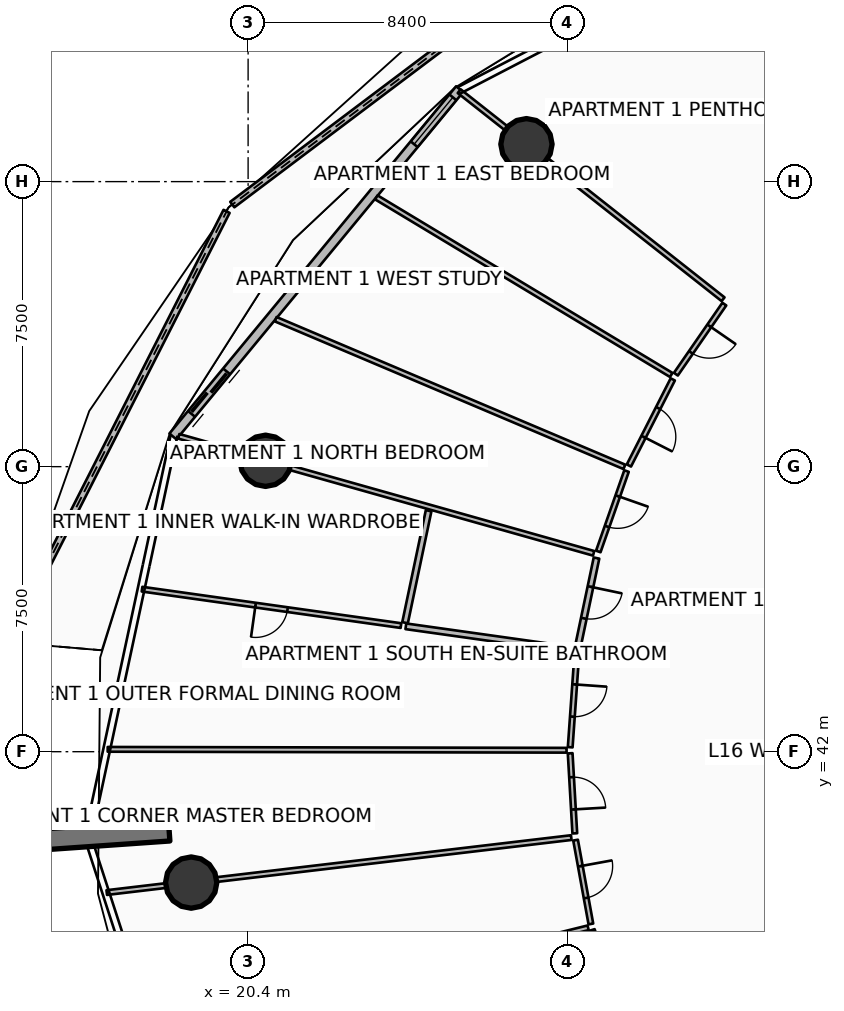
"""IFC4 building model, lengths in metres.
Left out: names, types, materials, properties, quantities, classifications, styles, units other than length and angle.
Written with IfcOpenShell. Run it as: python <this file> out.ifc"""

import sys

from ifc_helpers import new_model, si_unit, direction, frame, frame_2d, origin, origin_2d, place, context, subcontext, project, spatial, polyline, rectangle, circle, outline, extrude, element, fill, save


model = new_model("IFC4")
c1 = context("Model", 3, precision=1e-05, world=origin(), true_north=direction((0.0, 1.0)))
c2 = subcontext(c1, "Body", "Model", "MODEL_VIEW")
j1 = project(units=[si_unit("LENGTHUNIT", "METRE"), si_unit("PLANEANGLEUNIT", "RADIAN")], contexts=[c1])
p1 = place(None, origin())
s1 = spatial("IfcSite", under=j1, at=p1, CompositionType="ELEMENT")
p2 = place(p1, origin())
s2 = spatial("IfcBuilding", under=s1, at=p2, CompositionType="ELEMENT")
p3 = place(p2, frame((0.0, 0.0, 67.65)))
s3 = spatial("IfcBuildingStorey", under=s2, at=p3, CompositionType="ELEMENT", Elevation=67.65)
p4 = place(p3, frame((18.322, 39.925, 0.0), z_axis=(0.0, 0.0, 1.0), x_axis=(-0.997564163539, -0.069754853754, 0.0)))
e1 = element("IfcWall", 1, at=p4, inside=s3, PredefinedType="SOLIDWALL", context=c2, shape_type="SweptSolid", body=[
    extrude(rectangle(XDim=3.5, YDim=0.55, at=frame_2d((1.75, 0.0))), origin(), (0.0, 0.0, 1.0), 3.75),
])
for number, where, z_axis, x_axis in (
    (2, (27.724, 57.984, 0.0), (0.0, 0.0, 1.0), (1.0, 0.0, 0.0)),
    (3, (20.859, 49.655, 0.0), (0.0, 0.0, 1.0), (1.0, 0.0, 0.0)),
    (4, (18.902, 38.556, 0.0), (0.0, 0.0, 1.0), (1.0, 0.0, 0.0)),
):
    element("IfcColumn", number, at=place(p3, frame(where, z_axis=z_axis, x_axis=x_axis)), inside=s3, PredefinedType="COLUMN", context=c2, shape_type="SweptSolid", body=[
        extrude(circle(Radius=0.675, at=origin_2d()), origin(), (0.0, 0.0, 1.0), 3.35),
    ])
p5 = place(p3, frame((29.413, 63.495, 0.0), z_axis=(0.0, 0.0, 1.0), x_axis=(-0.798916487869, -0.601441971773, 0.0)))
e5 = element("IfcWall", 5, at=p5, inside=s3, PredefinedType="PARAPET", context=c2, shape_type="SweptSolid", body=[
    extrude(outline(polyline([(0.0, 0.0), (11.803, 0.0), (11.803, 1.348), (5.902, 1.182), (0.0, 1.12), (0.0, 0.0)])), frame((0.0, 0.09, 0.0), z_axis=(0.0, -1.0, 0.0), x_axis=(1.0, 0.0, 0.0)), (0.0, 0.0, 1.0), 0.18),
])
p6 = place(p3, frame((19.833, 56.217, 0.0), z_axis=(0.0, 0.0, 1.0), x_axis=(-0.452795448166, -0.891614424581, 0.0)))
e6 = element("IfcWall", 6, at=p6, inside=s3, PredefinedType="PARAPET", context=c2, shape_type="SweptSolid", body=[
    extrude(outline(polyline([(0.0, 0.0), (12.717, 0.0), (12.717, 1.747), (6.358, 1.562), (0.0, 1.348), (0.0, 0.0)])), frame((0.0, 0.09, 0.0), z_axis=(0.0, -1.0, 0.0), x_axis=(1.0, 0.0, 0.0)), (0.0, 0.0, 1.0), 0.18),
])
p7 = place(p3, frame((25.967, 59.433, 0.0), z_axis=(0.0, 0.0, 1.0), x_axis=(-0.636674332663, -0.771132799281, 0.0)))
e7 = element("IfcWall", 7, at=p7, inside=s3, PredefinedType="SOLIDWALL", context=c2, shape_type="SweptSolid", body=[
    extrude(rectangle(XDim=11.851, YDim=0.24, at=frame_2d((5.926, 0.0))), origin(), (0.0, 0.0, 1.0), 2.3),
])
p8 = place(p7, frame((9.631, 0.0, 0.0)))
e8 = element("IfcOpeningElement", 8, at=p8, cuts=e7, PredefinedType="OPENING", context=c2, shape_type="SweptSolid", body=[
    extrude(rectangle(XDim=1.45, YDim=2.15, at=frame_2d((0.725, 1.075))), frame((0.0, 0.13, 0.0), z_axis=(0.0, -1.0, 0.0), x_axis=(1.0, 0.0, 0.0)), (0.0, 0.0, 1.0), 0.26),
])
p9 = place(p7, frame((0.28, 0.0, 0.65)))
e9 = element("IfcOpeningElement", 9, at=p9, cuts=e7, PredefinedType="OPENING", context=c2, shape_type="SweptSolid", body=[
    extrude(rectangle(XDim=1.6, YDim=1.5, at=frame_2d((0.8, 0.75))), frame((0.0, 0.13, 0.0), z_axis=(0.0, -1.0, 0.0), x_axis=(1.0, 0.0, 0.0)), (0.0, 0.0, 1.0), 0.26),
])
p10 = place(p3, frame((32.898, 53.905, 0.0), z_axis=(0.0, 0.0, 1.0), x_axis=(-0.78532854108, 0.619079221558, 0.0)))
e10 = element("IfcWall", 10, at=p10, inside=s3, PredefinedType="PARTITIONING", context=c2, shape_type="SweptSolid", body=[
    extrude(rectangle(XDim=8.842, YDim=0.125, at=frame_2d((4.421, 0.0))), origin(), (0.0, 0.0, 1.0), 2.717),
])
p11 = place(p3, frame((31.534, 51.913, 0.0), z_axis=(0.0, 0.0, 1.0), x_axis=(-0.856706990958, 0.515803384676, 0.0)))
e11 = element("IfcWall", 11, at=p11, inside=s3, PredefinedType="PARTITIONING", context=c2, shape_type="SweptSolid", body=[
    extrude(rectangle(XDim=9.057, YDim=0.125, at=frame_2d((4.528, 0.0))), origin(), (0.0, 0.0, 1.0), 2.79),
])
p12 = place(p3, frame((30.301, 49.494, 0.0), z_axis=(0.0, 0.0, 1.0), x_axis=(-0.920840746031, 0.389938867579, 0.0)))
e12 = element("IfcWall", 12, at=p12, inside=s3, PredefinedType="PARTITIONING", context=c2, shape_type="SweptSolid", body=[
    extrude(rectangle(XDim=9.966, YDim=0.125, at=frame_2d((4.983, 0.0))), origin(), (0.0, 0.0, 1.0), 2.79),
])
p13 = place(p3, frame((32.931, 53.778, 0.0), z_axis=(0.0, 0.0, 1.0), x_axis=(-0.568541738061, -0.822654418382, 0.0)))
e13 = element("IfcWall", 13, at=p13, inside=s3, PredefinedType="PARTITIONING", context=c2, shape_type="SweptSolid", body=[
    extrude(rectangle(XDim=2.242, YDim=0.125, at=frame_2d((1.121, 0.0))), origin(), (0.0, 0.0, 1.0), 2.717),
])
p14 = place(p13, frame((0.696, 0.0, 0.0)))
e14 = element("IfcOpeningElement", 14, at=p14, cuts=e13, PredefinedType="OPENING", context=c2, shape_type="SweptSolid", body=[
    extrude(rectangle(XDim=0.85, YDim=2.06, at=frame_2d((0.425, 1.03))), frame((0.0, 0.073, 0.0), z_axis=(0.0, -1.0, 0.0), x_axis=(1.0, 0.0, 0.0)), (0.0, 0.0, 1.0), 0.145),
])
p15 = place(p3, frame((31.575, 51.796, 0.0), z_axis=(0.0, 0.0, 1.0), x_axis=(-0.454037986735, -0.890982326762, 0.0)))
e15 = element("IfcWall", 15, at=p15, inside=s3, PredefinedType="PARTITIONING", context=c2, shape_type="SweptSolid", body=[
    extrude(rectangle(XDim=2.542, YDim=0.125, at=frame_2d((1.271, 0.0))), origin(), (0.0, 0.0, 1.0), 2.79),
])
p16 = place(p15, frame((0.846, 0.0, 0.0)))
e16 = element("IfcOpeningElement", 16, at=p16, cuts=e15, PredefinedType="OPENING", context=c2, shape_type="SweptSolid", body=[
    extrude(rectangle(XDim=0.85, YDim=2.06, at=frame_2d((0.425, 1.03))), frame((0.0, 0.073, 0.0), z_axis=(0.0, -1.0, 0.0), x_axis=(1.0, 0.0, 0.0)), (0.0, 0.0, 1.0), 0.145),
])
p17 = place(p3, frame((30.358, 49.384, 0.0), z_axis=(0.0, 0.0, 1.0), x_axis=(-0.331344536708, -0.943509829304, 0.0)))
e17 = element("IfcWall", 17, at=p17, inside=s3, PredefinedType="PARTITIONING", context=c2, shape_type="SweptSolid", body=[
    extrude(rectangle(XDim=2.242, YDim=0.125, at=frame_2d((1.121, 0.0))), origin(), (0.0, 0.0, 1.0), 2.717),
])
p18 = place(p17, frame((0.696, 0.0, 0.0)))
e18 = element("IfcOpeningElement", 18, at=p18, cuts=e17, PredefinedType="OPENING", context=c2, shape_type="SweptSolid", body=[
    extrude(rectangle(XDim=0.85, YDim=2.06, at=frame_2d((0.425, 1.03))), frame((0.0, 0.073, 0.0), z_axis=(0.0, -1.0, 0.0), x_axis=(1.0, 0.0, 0.0)), (0.0, 0.0, 1.0), 0.145),
])
p19 = place(p3, frame((29.492, 47.22, 0.0), z_axis=(0.0, 0.0, 1.0), x_axis=(-0.962454721813, 0.271442274635, 0.0)))
e19 = element("IfcWall", 19, at=p19, inside=s3, PredefinedType="PARTITIONING", context=c2, shape_type="SweptSolid", body=[
    extrude(rectangle(XDim=11.344, YDim=0.125, at=frame_2d((5.672, 0.0))), origin(), (0.0, 0.0, 1.0), 2.717),
])
p20 = place(p3, frame((29.568, 47.095, 0.0), z_axis=(0.0, 0.0, 1.0), x_axis=(-0.205861309483, -0.978581177654, 0.0)))
e20 = element("IfcWall", 20, at=p20, inside=s3, PredefinedType="PARTITIONING", context=c2, shape_type="SweptSolid", body=[
    extrude(rectangle(XDim=2.392, YDim=0.15, at=frame_2d((1.196, 0.0))), origin(), (0.0, 0.0, 1.0), 2.717),
])
p21 = place(p20, frame((0.771, 0.0, 0.0)))
e21 = element("IfcOpeningElement", 21, at=p21, cuts=e20, PredefinedType="OPENING", context=c2, shape_type="SweptSolid", body=[
    extrude(rectangle(XDim=0.85, YDim=2.06, at=frame_2d((0.425, 1.03))), frame((0.0, 0.085, 0.0), z_axis=(0.0, -1.0, 0.0), x_axis=(1.0, 0.0, 0.0)), (0.0, 0.0, 1.0), 0.17),
])
p22 = place(p3, frame((25.15, 48.341, 0.0), z_axis=(0.0, 0.0, 1.0), x_axis=(-0.205879759174, -0.978577296264, 0.0)))
e22 = element("IfcWall", 22, at=p22, inside=s3, PredefinedType="PARTITIONING", context=c2, shape_type="SweptSolid", body=[
    extrude(rectangle(XDim=3.012, YDim=0.15, at=frame_2d((1.506, 0.0))), origin(), (0.0, 0.0, 1.0), 2.717),
])
p23 = place(p3, frame((28.968, 44.678, 0.0), z_axis=(0.0, 0.0, 1.0), x_axis=(-0.990240767804, 0.139367219172, 0.0)))
e23 = element("IfcWall", 23, at=p23, inside=s3, PredefinedType="PARTITIONING", context=c2, shape_type="SweptSolid", body=[
    extrude(rectangle(XDim=4.46, YDim=0.15, at=frame_2d((2.23, 0.0))), origin(), (0.0, 0.0, 1.0), 2.79),
])
p24 = place(p3, frame((24.422, 45.318, 0.0), z_axis=(0.0, 0.0, 1.0), x_axis=(-0.990243959665, 0.139344538274, 0.0)))
e24 = element("IfcWall", 24, at=p24, inside=s3, PredefinedType="PARTITIONING", context=c2, shape_type="SweptSolid", body=[
    extrude(rectangle(XDim=6.88, YDim=0.125, at=frame_2d((3.44, 0.0))), origin(), (0.0, 0.0, 1.0), 2.79),
])
p25 = place(p24, frame((3.015, 0.0, 0.0)))
e25 = element("IfcOpeningElement", 25, at=p25, cuts=e24, PredefinedType="OPENING", context=c2, shape_type="SweptSolid", body=[
    extrude(rectangle(XDim=0.85, YDim=2.06, at=frame_2d((0.425, 1.03))), frame((0.0, 0.073, 0.0), z_axis=(0.0, -1.0, 0.0), x_axis=(1.0, 0.0, 0.0)), (0.0, 0.0, 1.0), 0.145),
])
p26 = place(p3, frame((28.78, 42.038, 0.0), z_axis=(0.0, 0.0, 1.0), x_axis=(-0.999998036955, 0.001981435282, 0.0)))
e26 = element("IfcWall", 26, at=p26, inside=s3, PredefinedType="PARTITIONING", context=c2, shape_type="SweptSolid", body=[
    extrude(rectangle(XDim=12.075, YDim=0.125, at=frame_2d((6.038, 0.0))), origin(), (0.0, 0.0, 1.0), 2.79),
])
p27 = place(p3, frame((29.05, 44.576, 0.0), z_axis=(0.0, 0.0, 1.0), x_axis=(-0.070831673661, -0.997488282641, 0.0)))
e27 = element("IfcWall", 27, at=p27, inside=s3, PredefinedType="PARTITIONING", context=c2, shape_type="SweptSolid", body=[
    extrude(rectangle(XDim=2.464, YDim=0.125, at=frame_2d((1.232, 0.0))), origin(), (0.0, 0.0, 1.0), 2.79),
])
p28 = place(p27, frame((0.807, 0.0, 0.0)))
e28 = element("IfcOpeningElement", 28, at=p28, cuts=e27, PredefinedType="OPENING", context=c2, shape_type="SweptSolid", body=[
    extrude(rectangle(XDim=0.85, YDim=2.06, at=frame_2d((0.425, 1.03))), frame((0.0, 0.073, 0.0), z_axis=(0.0, -1.0, 0.0), x_axis=(1.0, 0.0, 0.0)), (0.0, 0.0, 1.0), 0.145),
])
p29 = place(p3, frame((28.875, 41.958, 0.0), z_axis=(0.0, 0.0, 1.0), x_axis=(0.057962417622, -0.998318765797, 0.0)))
e29 = element("IfcWall", 29, at=p29, inside=s3, PredefinedType="PARTITIONING", context=c2, shape_type="SweptSolid", body=[
    extrude(rectangle(XDim=2.11, YDim=0.125, at=frame_2d((1.055, 0.0))), origin(), (0.0, 0.0, 1.0), 2.717),
])
p30 = place(p29, frame((0.63, 0.0, 0.0)))
e30 = element("IfcOpeningElement", 30, at=p30, cuts=e29, PredefinedType="OPENING", context=c2, shape_type="SweptSolid", body=[
    extrude(rectangle(XDim=0.85, YDim=2.06, at=frame_2d((0.425, 1.03))), frame((0.0, 0.073, 0.0), z_axis=(0.0, -1.0, 0.0), x_axis=(1.0, 0.0, 0.0)), (0.0, 0.0, 1.0), 0.145),
])
p31 = place(p3, frame((28.903, 39.74, 0.0), z_axis=(0.0, 0.0, 1.0), x_axis=(-0.993068040113, -0.117540919282, 0.0)))
e31 = element("IfcWall", 31, at=p31, inside=s3, PredefinedType="PARTITIONING", context=c2, shape_type="SweptSolid", body=[
    extrude(rectangle(XDim=12.309, YDim=0.125, at=frame_2d((6.154, 0.0))), origin(), (0.0, 0.0, 1.0), 2.717),
])
p32 = place(p3, frame((29.347, 37.366, 0.0), z_axis=(0.0, 0.0, 1.0), x_axis=(-0.970510462135, -0.241059002917, 0.0)))
e32 = element("IfcWall", 32, at=p32, inside=s3, PredefinedType="PARTITIONING", context=c2, shape_type="SweptSolid", body=[
    extrude(rectangle(XDim=11.79, YDim=0.125, at=frame_2d((5.895, 0.0))), origin(), (0.0, 0.0, 1.0), 2.79),
])
p33 = place(p3, frame((29.017, 39.673, 0.0), z_axis=(0.0, 0.0, 1.0), x_axis=(0.179632658462, -0.983733758704, 0.0)))
e33 = element("IfcWall", 33, at=p33, inside=s3, PredefinedType="PARTITIONING", context=c2, shape_type="SweptSolid", body=[
    extrude(rectangle(XDim=2.242, YDim=0.125, at=frame_2d((1.121, 0.0))), origin(), (0.0, 0.0, 1.0), 2.717),
])
p34 = place(p33, frame((0.696, 0.0, 0.0)))
e34 = element("IfcOpeningElement", 34, at=p34, cuts=e33, PredefinedType="OPENING", context=c2, shape_type="SweptSolid", body=[
    extrude(rectangle(XDim=0.85, YDim=2.06, at=frame_2d((0.425, 1.03))), frame((0.0, 0.073, 0.0), z_axis=(0.0, -1.0, 0.0), x_axis=(1.0, 0.0, 0.0)), (0.0, 0.0, 1.0), 0.145),
])
p35 = place(p3, frame((29.458, 37.312, 0.0), z_axis=(0.0, 0.0, 1.0), x_axis=(0.305338513131, -0.952243872335, 0.0)))
e35 = element("IfcWall", 35, at=p35, inside=s3, PredefinedType="PARTITIONING", context=c2, shape_type="SweptSolid", body=[
    extrude(rectangle(XDim=2.392, YDim=0.125, at=frame_2d((1.196, 0.0))), origin(), (0.0, 0.0, 1.0), 2.79),
])
p36 = place(p35, frame((0.771, 0.0, 0.0)))
e36 = element("IfcOpeningElement", 36, at=p36, cuts=e35, PredefinedType="OPENING", context=c2, shape_type="SweptSolid", body=[
    extrude(rectangle(XDim=0.85, YDim=2.06, at=frame_2d((0.425, 1.03))), frame((0.0, 0.073, 0.0), z_axis=(0.0, -1.0, 0.0), x_axis=(1.0, 0.0, 0.0)), (0.0, 0.0, 1.0), 0.145),
])
p37 = place(p8, origin())
e37 = element("IfcDoor", 37, at=p37, inside=s3, OperationType="DOUBLE_DOOR_SLIDING", PredefinedType="DOOR", context=c2, shape_type="SweptSolid", body=[
    extrude(rectangle(XDim=1.45, YDim=2.15, at=frame_2d((0.725, 1.075))), frame((0.0, 0.025, 0.0), z_axis=(0.0, -1.0, 0.0), x_axis=(1.0, 0.0, 0.0)), (0.0, 0.0, 1.0), 0.05),
])
fill(e8, e37)
p38 = place(p9, origin())
e38 = element("IfcWindow", 38, at=p38, inside=s3, PartitioningType="SINGLE_PANEL", PredefinedType="WINDOW", context=c2, shape_type="SweptSolid", body=[
    extrude(rectangle(XDim=1.6, YDim=1.5, at=frame_2d((0.8, 0.75))), frame((0.0, 0.03, 0.0), z_axis=(0.0, -1.0, 0.0), x_axis=(1.0, 0.0, 0.0)), (0.0, 0.0, 1.0), 0.06),
])
fill(e9, e38)
p39 = place(p14, origin())
e39 = element("IfcDoor", 39, at=p39, inside=s3, OperationType="SINGLE_SWING_LEFT", PredefinedType="DOOR", context=c2, shape_type="SweptSolid", body=[
    extrude(rectangle(XDim=0.85, YDim=2.06, at=frame_2d((0.425, 1.03))), frame((0.0, 0.025, 0.0), z_axis=(0.0, -1.0, 0.0), x_axis=(1.0, 0.0, 0.0)), (0.0, 0.0, 1.0), 0.05),
])
fill(e14, e39)
p40 = place(p16, origin())
e40 = element("IfcDoor", 40, at=p40, inside=s3, OperationType="SINGLE_SWING_RIGHT", PredefinedType="DOOR", context=c2, shape_type="SweptSolid", body=[
    extrude(rectangle(XDim=0.85, YDim=2.06, at=frame_2d((0.425, 1.03))), frame((0.0, 0.025, 0.0), z_axis=(0.0, -1.0, 0.0), x_axis=(1.0, 0.0, 0.0)), (0.0, 0.0, 1.0), 0.05),
])
fill(e16, e40)
p41 = place(p18, origin())
e41 = element("IfcDoor", 41, at=p41, inside=s3, OperationType="SINGLE_SWING_LEFT", PredefinedType="DOOR", context=c2, shape_type="SweptSolid", body=[
    extrude(rectangle(XDim=0.85, YDim=2.06, at=frame_2d((0.425, 1.03))), frame((0.0, 0.025, 0.0), z_axis=(0.0, -1.0, 0.0), x_axis=(1.0, 0.0, 0.0)), (0.0, 0.0, 1.0), 0.05),
])
fill(e18, e41)
p42 = place(p21, origin())
e42 = element("IfcDoor", 42, at=p42, inside=s3, OperationType="SINGLE_SWING_LEFT", PredefinedType="DOOR", context=c2, shape_type="SweptSolid", body=[
    extrude(rectangle(XDim=0.85, YDim=2.06, at=frame_2d((0.425, 1.03))), frame((0.0, 0.025, 0.0), z_axis=(0.0, -1.0, 0.0), x_axis=(1.0, 0.0, 0.0)), (0.0, 0.0, 1.0), 0.05),
])
fill(e21, e42)
p43 = place(p25, origin())
e43 = element("IfcDoor", 43, at=p43, inside=s3, OperationType="SINGLE_SWING_RIGHT", PredefinedType="DOOR", context=c2, shape_type="SweptSolid", body=[
    extrude(rectangle(XDim=0.85, YDim=2.06, at=frame_2d((0.425, 1.03))), frame((0.0, 0.025, 0.0), z_axis=(0.0, -1.0, 0.0), x_axis=(1.0, 0.0, 0.0)), (0.0, 0.0, 1.0), 0.05),
])
fill(e25, e43)
p44 = place(p28, origin())
e44 = element("IfcDoor", 44, at=p44, inside=s3, OperationType="SINGLE_SWING_LEFT", PredefinedType="DOOR", context=c2, shape_type="SweptSolid", body=[
    extrude(rectangle(XDim=0.85, YDim=2.06, at=frame_2d((0.425, 1.03))), frame((0.0, 0.025, 0.0), z_axis=(0.0, -1.0, 0.0), x_axis=(1.0, 0.0, 0.0)), (0.0, 0.0, 1.0), 0.05),
])
fill(e28, e44)
p45 = place(p30, origin())
e45 = element("IfcDoor", 45, at=p45, inside=s3, OperationType="SINGLE_SWING_RIGHT", PredefinedType="DOOR", context=c2, shape_type="SweptSolid", body=[
    extrude(rectangle(XDim=0.85, YDim=2.06, at=frame_2d((0.425, 1.03))), frame((0.0, 0.025, 0.0), z_axis=(0.0, -1.0, 0.0), x_axis=(1.0, 0.0, 0.0)), (0.0, 0.0, 1.0), 0.05),
])
fill(e30, e45)
p46 = place(p34, origin())
e46 = element("IfcDoor", 46, at=p46, inside=s3, OperationType="SINGLE_SWING_LEFT", PredefinedType="DOOR", context=c2, shape_type="SweptSolid", body=[
    extrude(rectangle(XDim=0.85, YDim=2.06, at=frame_2d((0.425, 1.03))), frame((0.0, 0.025, 0.0), z_axis=(0.0, -1.0, 0.0), x_axis=(1.0, 0.0, 0.0)), (0.0, 0.0, 1.0), 0.05),
])
fill(e34, e46)
save(model, sys.argv[1])
